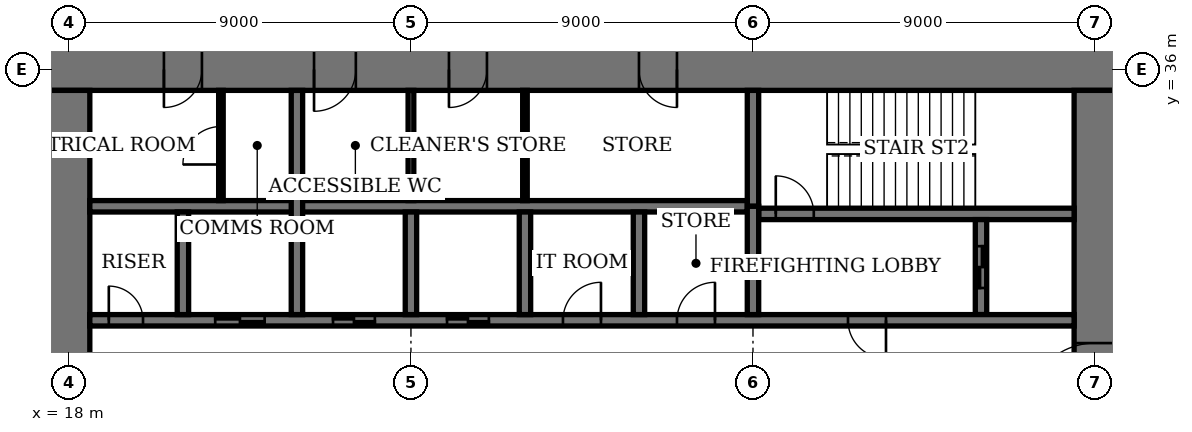
"""IFC4 building model, lengths in metres.
Left out: names, types, materials, properties, quantities, classifications, styles, units other than length and angle.
Written with IfcOpenShell. Run it as: python <this file> out.ifc"""

import sys

from ifc_helpers import new_model, si_unit, direction, frame, frame_2d, origin, place, context, subcontext, project, spatial, rectangle, extrude, element, fill, save


model = new_model("IFC4")
c1 = context("Model", 3, precision=1e-05, world=origin(), true_north=direction((0.0, 1.0)))
c2 = subcontext(c1, "Body", "Model", "MODEL_VIEW")
j1 = project(units=[si_unit("LENGTHUNIT", "METRE"), si_unit("PLANEANGLEUNIT", "RADIAN")], contexts=[c1])
p1 = place(None, origin())
s1 = spatial("IfcSite", under=j1, at=p1, CompositionType="ELEMENT")
p2 = place(p1, origin())
s2 = spatial("IfcBuilding", under=s1, at=p2, CompositionType="ELEMENT")
p3 = place(p2, frame((0.0, 0.0, 190.2)))
s3 = spatial("IfcBuildingStorey", under=s2, at=p3, CompositionType="ELEMENT", Elevation=190.2)
p4 = place(p3, frame((45.55, 36.0, 0.0), z_axis=(0.0, 0.0, 1.0), x_axis=(-1.0, 0.0, 0.0)))
e1 = element("IfcWall", 1, at=p4, inside=s3, PredefinedType="SHEAR", context=c2, shape_type="SweptSolid", body=[
    extrude(rectangle(XDim=28.1, YDim=1.1, at=frame_2d((14.05, 0.0))), origin(), (0.0, 0.0, 1.0), 4.0),
])
p5 = place(p4, frame((11.55, 0.0, 0.0)))
e2 = element("IfcOpeningElement", 2, at=p5, cuts=e1, PredefinedType="OPENING", context=c2, shape_type="SweptSolid", body=[
    extrude(rectangle(XDim=1.0, YDim=2.4, at=frame_2d((0.5, 1.2))), frame((0.0, 0.56, 0.0), z_axis=(0.0, -1.0, 0.0), x_axis=(1.0, 0.0, 0.0)), (0.0, 0.0, 1.0), 1.12),
])
p6 = place(p4, frame((16.55, 0.0, 0.0)))
e3 = element("IfcOpeningElement", 3, at=p6, cuts=e1, PredefinedType="OPENING", context=c2, shape_type="SweptSolid", body=[
    extrude(rectangle(XDim=1.0, YDim=2.4, at=frame_2d((0.5, 1.2))), frame((0.0, 0.56, 0.0), z_axis=(0.0, -1.0, 0.0), x_axis=(1.0, 0.0, 0.0)), (0.0, 0.0, 1.0), 1.12),
])
p7 = place(p4, frame((20.0, 0.0, 0.0)))
e4 = element("IfcOpeningElement", 4, at=p7, cuts=e1, PredefinedType="OPENING", context=c2, shape_type="SweptSolid", body=[
    extrude(rectangle(XDim=1.1, YDim=2.4, at=frame_2d((0.55, 1.2))), frame((0.0, 0.56, 0.0), z_axis=(0.0, -1.0, 0.0), x_axis=(1.0, 0.0, 0.0)), (0.0, 0.0, 1.0), 1.12),
])
p8 = place(p4, frame((24.05, 0.0, 0.0)))
e5 = element("IfcOpeningElement", 5, at=p8, cuts=e1, PredefinedType="OPENING", context=c2, shape_type="SweptSolid", body=[
    extrude(rectangle(XDim=1.0, YDim=2.4, at=frame_2d((0.5, 1.2))), frame((0.0, 0.56, 0.0), z_axis=(0.0, -1.0, 0.0), x_axis=(1.0, 0.0, 0.0)), (0.0, 0.0, 1.0), 1.12),
])
p9 = place(p3, frame((18.0, 35.45, 0.0), z_axis=(0.0, 0.0, 1.0), x_axis=(0.0, -1.0, 0.0)))
e6 = element("IfcWall", 6, at=p9, inside=s3, PredefinedType="SHEAR", context=c2, shape_type="SweptSolid", body=[
    extrude(rectangle(XDim=16.9, YDim=1.1, at=frame_2d((8.45, 0.0))), origin(), (0.0, 0.0, 1.0), 4.0),
])
p10 = place(p9, frame((8.45, 0.0, 0.0)))
e7 = element("IfcOpeningElement", 7, at=p10, cuts=e6, PredefinedType="OPENING", context=c2, shape_type="SweptSolid", body=[
    extrude(rectangle(XDim=1.8, YDim=2.4, at=frame_2d((0.9, 1.2))), frame((0.0, 0.56, 0.0), z_axis=(0.0, -1.0, 0.0), x_axis=(1.0, 0.0, 0.0)), (0.0, 0.0, 1.0), 1.12),
])
p11 = place(p3, frame((45.0, 18.55, 0.0), z_axis=(0.0, 0.0, 1.0), x_axis=(0.0, 1.0, 0.0)))
e8 = element("IfcWall", 8, at=p11, inside=s3, PredefinedType="SHEAR", context=c2, shape_type="SweptSolid", body=[
    extrude(rectangle(XDim=16.9, YDim=1.1, at=frame_2d((8.45, 0.0))), origin(), (0.0, 0.0, 1.0), 4.0),
])
p12 = place(p11, frame((8.45, 0.0, 0.0)))
e9 = element("IfcOpeningElement", 9, at=p12, cuts=e8, PredefinedType="OPENING", context=c2, shape_type="SweptSolid", body=[
    extrude(rectangle(XDim=1.8, YDim=2.4, at=frame_2d((0.9, 1.2))), frame((0.0, 0.56, 0.0), z_axis=(0.0, -1.0, 0.0), x_axis=(1.0, 0.0, 0.0)), (0.0, 0.0, 1.0), 1.12),
])
p13 = place(p3, frame((36.15, 32.2, 0.0), z_axis=(0.0, 0.0, 1.0), x_axis=(1.0, 0.0, 0.0)))
e10 = element("IfcWall", 10, at=p13, inside=s3, PredefinedType="SHEAR", context=c2, shape_type="SweptSolid", body=[
    extrude(rectangle(XDim=8.3, YDim=0.3, at=frame_2d((4.15, 0.0))), origin(), (0.0, 0.0, 1.0), 4.0),
])
p14 = place(p13, frame((0.45, 0.0, 0.0)))
e11 = element("IfcOpeningElement", 11, at=p14, cuts=e10, PredefinedType="OPENING", context=c2, shape_type="SweptSolid", body=[
    extrude(rectangle(XDim=1.0, YDim=2.4, at=frame_2d((0.5, 1.2))), frame((0.0, 0.16, 0.0), z_axis=(0.0, -1.0, 0.0), x_axis=(1.0, 0.0, 0.0)), (0.0, 0.0, 1.0), 0.32),
])
p15 = place(p3, frame((36.0, 32.4, 0.0), z_axis=(0.0, 0.0, 1.0), x_axis=(0.0, 1.0, 0.0)))
e12 = element("IfcWall", 12, at=p15, inside=s3, PredefinedType="SHEAR", context=c2, shape_type="SweptSolid", body=[
    extrude(rectangle(XDim=3.05, YDim=0.3, at=frame_2d((1.525, 0.0))), origin(), (0.0, 0.0, 1.0), 4.0),
])
p16 = place(p3, frame((42.0, 29.55, 0.0), z_axis=(0.0, 0.0, 1.0), x_axis=(0.0, 1.0, 0.0)))
e13 = element("IfcWall", 13, at=p16, inside=s3, PredefinedType="SHEAR", context=c2, shape_type="SweptSolid", body=[
    extrude(rectangle(XDim=2.5, YDim=0.3, at=frame_2d((1.25, 0.0))), origin(), (0.0, 0.0, 1.0), 4.0),
])
p17 = place(p16, frame((0.7, 0.0, 0.0)))
e14 = element("IfcOpeningElement", 14, at=p17, cuts=e13, PredefinedType="OPENING", context=c2, shape_type="SweptSolid", body=[
    extrude(rectangle(XDim=1.1, YDim=2.4, at=frame_2d((0.55, 1.2))), frame((0.0, 0.16, 0.0), z_axis=(0.0, -1.0, 0.0), x_axis=(1.0, 0.0, 0.0)), (0.0, 0.0, 1.0), 0.32),
])
p18 = place(p3, frame((18.55, 29.4, 0.0), z_axis=(0.0, 0.0, 1.0), x_axis=(1.0, 0.0, 0.0)))
e15 = element("IfcWall", 15, at=p18, inside=s3, PredefinedType="SHEAR", context=c2, shape_type="SweptSolid", body=[
    extrude(rectangle(XDim=25.9, YDim=0.3, at=frame_2d((12.95, 0.0))), origin(), (0.0, 0.0, 1.0), 4.0),
])
p19 = place(p18, frame((19.95, 0.0, 0.0)))
e16 = element("IfcOpeningElement", 16, at=p19, cuts=e15, PredefinedType="OPENING", context=c2, shape_type="SweptSolid", body=[
    extrude(rectangle(XDim=1.0, YDim=2.4, at=frame_2d((0.5, 1.2))), frame((0.0, 0.16, 0.0), z_axis=(0.0, -1.0, 0.0), x_axis=(1.0, 0.0, 0.0)), (0.0, 0.0, 1.0), 0.32),
])
p20 = place(p18, frame((0.5, 0.0, 0.0)))
e17 = element("IfcOpeningElement", 17, at=p20, cuts=e15, PredefinedType="OPENING", context=c2, shape_type="SweptSolid", body=[
    extrude(rectangle(XDim=0.9, YDim=2.1, at=frame_2d((0.45, 1.05))), frame((0.0, 0.16, 0.0), z_axis=(0.0, -1.0, 0.0), x_axis=(1.0, 0.0, 0.0)), (0.0, 0.0, 1.0), 0.32),
])
p21 = place(p18, frame((15.45, 0.0, 0.0)))
e18 = element("IfcOpeningElement", 18, at=p21, cuts=e15, PredefinedType="OPENING", context=c2, shape_type="SweptSolid", body=[
    extrude(rectangle(XDim=1.0, YDim=2.4, at=frame_2d((0.5, 1.2))), frame((0.0, 0.16, 0.0), z_axis=(0.0, -1.0, 0.0), x_axis=(1.0, 0.0, 0.0)), (0.0, 0.0, 1.0), 0.32),
])
p22 = place(p18, frame((12.45, 0.0, 0.0)))
e19 = element("IfcOpeningElement", 19, at=p22, cuts=e15, PredefinedType="OPENING", context=c2, shape_type="SweptSolid", body=[
    extrude(rectangle(XDim=1.0, YDim=2.4, at=frame_2d((0.5, 1.2))), frame((0.0, 0.16, 0.0), z_axis=(0.0, -1.0, 0.0), x_axis=(1.0, 0.0, 0.0)), (0.0, 0.0, 1.0), 0.32),
])
p23 = place(p18, frame((9.4, 0.0, 0.0)))
e20 = element("IfcOpeningElement", 20, at=p23, cuts=e15, PredefinedType="OPENING", context=c2, shape_type="SweptSolid", body=[
    extrude(rectangle(XDim=1.1, YDim=2.4, at=frame_2d((0.55, 1.2))), frame((0.0, 0.16, 0.0), z_axis=(0.0, -1.0, 0.0), x_axis=(1.0, 0.0, 0.0)), (0.0, 0.0, 1.0), 0.32),
])
p24 = place(p18, frame((6.4, 0.0, 0.0)))
e21 = element("IfcOpeningElement", 21, at=p24, cuts=e15, PredefinedType="OPENING", context=c2, shape_type="SweptSolid", body=[
    extrude(rectangle(XDim=1.1, YDim=2.4, at=frame_2d((0.55, 1.2))), frame((0.0, 0.16, 0.0), z_axis=(0.0, -1.0, 0.0), x_axis=(1.0, 0.0, 0.0)), (0.0, 0.0, 1.0), 0.32),
])
p25 = place(p18, frame((3.3, 0.0, 0.0)))
e22 = element("IfcOpeningElement", 22, at=p25, cuts=e15, PredefinedType="OPENING", context=c2, shape_type="SweptSolid", body=[
    extrude(rectangle(XDim=1.3, YDim=2.4, at=frame_2d((0.65, 1.2))), frame((0.0, 0.16, 0.0), z_axis=(0.0, -1.0, 0.0), x_axis=(1.0, 0.0, 0.0)), (0.0, 0.0, 1.0), 0.32),
])
p26 = place(p3, frame((18.55, 32.4, 0.0), z_axis=(0.0, 0.0, 1.0), x_axis=(1.0, 0.0, 0.0)))
e23 = element("IfcWall", 23, at=p26, inside=s3, PredefinedType="SHEAR", context=c2, shape_type="SweptSolid", body=[
    extrude(rectangle(XDim=17.3, YDim=0.3, at=frame_2d((8.65, 0.0))), origin(), (0.0, 0.0, 1.0), 4.0),
])
for number, where, z_axis, x_axis in (
    (24, (33.0, 29.55, 0.0), (0.0, 0.0, 1.0), (0.0, 1.0, 0.0)),
    (25, (30.0, 29.55, 0.0), (0.0, 0.0, 1.0), (0.0, 1.0, 0.0)),
    (26, (27.0, 29.55, 0.0), (0.0, 0.0, 1.0), (0.0, 1.0, 0.0)),
):
    element("IfcWall", number, at=place(p3, frame(where, z_axis=z_axis, x_axis=x_axis)), inside=s3, PredefinedType="SHEAR", context=c2, shape_type="SweptSolid", body=[
        extrude(rectangle(XDim=2.7, YDim=0.3, at=frame_2d((1.35, 0.0))), origin(), (0.0, 0.0, 1.0), 4.0),
    ])
p27 = place(p3, frame((24.0, 29.55, 0.0), z_axis=(0.0, 0.0, 1.0), x_axis=(0.0, 1.0, 0.0)))
e27 = element("IfcWall", 27, at=p27, inside=s3, PredefinedType="SHEAR", context=c2, shape_type="SweptSolid", body=[
    extrude(rectangle(XDim=5.9, YDim=0.3, at=frame_2d((2.95, 0.0))), origin(), (0.0, 0.0, 1.0), 4.0),
])
p28 = place(p3, frame((21.0, 29.55, 0.0), z_axis=(0.0, 0.0, 1.0), x_axis=(0.0, 1.0, 0.0)))
e28 = element("IfcWall", 28, at=p28, inside=s3, PredefinedType="SHEAR", context=c2, shape_type="SweptSolid", body=[
    extrude(rectangle(XDim=2.7, YDim=0.3, at=frame_2d((1.35, 0.0))), origin(), (0.0, 0.0, 1.0), 4.0),
])
p29 = place(p3, frame((36.0, 29.55, 0.0), z_axis=(0.0, 0.0, 1.0), x_axis=(0.0, 1.0, 0.0)))
e29 = element("IfcWall", 29, at=p29, inside=s3, PredefinedType="SHEAR", context=c2, shape_type="SweptSolid", body=[
    extrude(rectangle(XDim=2.85, YDim=0.3, at=frame_2d((1.425, 0.0))), origin(), (0.0, 0.0, 1.0), 4.0),
])
p30 = place(p3, frame((30.0, 32.55, 0.0), z_axis=(0.0, 0.0, 1.0), x_axis=(0.0, 1.0, 0.0)))
e30 = element("IfcWall", 30, at=p30, inside=s3, PredefinedType="PARTITIONING", context=c2, shape_type="SweptSolid", body=[
    extrude(rectangle(XDim=2.9, YDim=0.12, at=frame_2d((1.45, 0.0))), origin(), (0.0, 0.0, 1.0), 3.75),
])
p31 = place(p3, frame((27.0, 32.55, 0.0), z_axis=(0.0, 0.0, 1.0), x_axis=(0.0, 1.0, 0.0)))
e31 = element("IfcWall", 31, at=p31, inside=s3, PredefinedType="PARTITIONING", context=c2, shape_type="SweptSolid", body=[
    extrude(rectangle(XDim=2.9, YDim=0.15, at=frame_2d((1.45, 0.0))), origin(), (0.0, 0.0, 1.0), 3.75),
])
p32 = place(p3, frame((22.0, 32.55, 0.0), z_axis=(0.0, 0.0, 1.0), x_axis=(0.0, 1.0, 0.0)))
e32 = element("IfcWall", 32, at=p32, inside=s3, PredefinedType="PARTITIONING", context=c2, shape_type="SweptSolid", body=[
    extrude(rectangle(XDim=2.9, YDim=0.12, at=frame_2d((1.45, 0.0))), origin(), (0.0, 0.0, 1.0), 3.75),
])
p33 = place(p32, frame((0.95, 0.0, 0.0)))
e33 = element("IfcOpeningElement", 33, at=p33, cuts=e32, PredefinedType="OPENING", context=c2, shape_type="SweptSolid", body=[
    extrude(rectangle(XDim=1.0, YDim=2.4, at=frame_2d((0.5, 1.2))), frame((0.0, 0.07, 0.0), z_axis=(0.0, -1.0, 0.0), x_axis=(1.0, 0.0, 0.0)), (0.0, 0.0, 1.0), 0.14),
])
p34 = place(p12, origin())
e34 = element("IfcDoor", 34, at=p34, inside=s3, OperationType="DOUBLE_DOOR_DOUBLE_SWING", PredefinedType="DOOR", context=c2, shape_type="SweptSolid", body=[
    extrude(rectangle(XDim=1.8, YDim=2.4, at=frame_2d((0.9, 1.2))), frame((0.0, 0.03, 0.0), z_axis=(0.0, -1.0, 0.0), x_axis=(1.0, 0.0, 0.0)), (0.0, 0.0, 1.0), 0.06),
    extrude(rectangle(XDim=0.04, YDim=2.4, at=frame_2d((0.02, 1.2))), frame((0.0, 0.55, 0.0), z_axis=(0.0, -1.0, 0.0), x_axis=(1.0, 0.0, 0.0)), (0.0, 0.0, 1.0), 1.1),
    extrude(rectangle(XDim=0.04, YDim=2.4, at=frame_2d((1.78, 1.2))), frame((0.0, 0.55, 0.0), z_axis=(0.0, -1.0, 0.0), x_axis=(1.0, 0.0, 0.0)), (0.0, 0.0, 1.0), 1.1),
    extrude(rectangle(XDim=1.8, YDim=0.04, at=frame_2d((0.9, 2.38))), frame((0.0, 0.55, 0.0), z_axis=(0.0, -1.0, 0.0), x_axis=(1.0, 0.0, 0.0)), (0.0, 0.0, 1.0), 1.1),
])
fill(e9, e34)
p35 = place(p5, origin())
e35 = element("IfcDoor", 35, at=p35, inside=s3, OperationType="SINGLE_SWING_RIGHT", PredefinedType="DOOR", context=c2, shape_type="SweptSolid", body=[
    extrude(rectangle(XDim=1.0, YDim=2.4, at=frame_2d((0.5, 1.2))), frame((0.0, 0.025, 0.0), z_axis=(0.0, -1.0, 0.0), x_axis=(1.0, 0.0, 0.0)), (0.0, 0.0, 1.0), 0.05),
    extrude(rectangle(XDim=0.04, YDim=2.4, at=frame_2d((0.02, 1.2))), frame((0.0, 0.4, 0.0), z_axis=(0.0, -1.0, 0.0), x_axis=(1.0, 0.0, 0.0)), (0.0, 0.0, 1.0), 0.8),
    extrude(rectangle(XDim=0.04, YDim=2.4, at=frame_2d((0.98, 1.2))), frame((0.0, 0.4, 0.0), z_axis=(0.0, -1.0, 0.0), x_axis=(1.0, 0.0, 0.0)), (0.0, 0.0, 1.0), 0.8),
    extrude(rectangle(XDim=1.0, YDim=0.04, at=frame_2d((0.5, 2.38))), frame((0.0, 0.4, 0.0), z_axis=(0.0, -1.0, 0.0), x_axis=(1.0, 0.0, 0.0)), (0.0, 0.0, 1.0), 0.8),
])
fill(e2, e35)
p36 = place(p6, origin())
e36 = element("IfcDoor", 36, at=p36, inside=s3, OperationType="SINGLE_SWING_LEFT", PredefinedType="DOOR", context=c2, shape_type="SweptSolid", body=[
    extrude(rectangle(XDim=1.0, YDim=2.4, at=frame_2d((0.5, 1.2))), frame((0.0, 0.025, 0.0), z_axis=(0.0, -1.0, 0.0), x_axis=(1.0, 0.0, 0.0)), (0.0, 0.0, 1.0), 0.05),
    extrude(rectangle(XDim=0.04, YDim=2.4, at=frame_2d((0.02, 1.2))), frame((0.0, 0.4, 0.0), z_axis=(0.0, -1.0, 0.0), x_axis=(1.0, 0.0, 0.0)), (0.0, 0.0, 1.0), 0.8),
    extrude(rectangle(XDim=0.04, YDim=2.4, at=frame_2d((0.98, 1.2))), frame((0.0, 0.4, 0.0), z_axis=(0.0, -1.0, 0.0), x_axis=(1.0, 0.0, 0.0)), (0.0, 0.0, 1.0), 0.8),
    extrude(rectangle(XDim=1.0, YDim=0.04, at=frame_2d((0.5, 2.38))), frame((0.0, 0.4, 0.0), z_axis=(0.0, -1.0, 0.0), x_axis=(1.0, 0.0, 0.0)), (0.0, 0.0, 1.0), 0.8),
])
fill(e3, e36)
p37 = place(p7, origin())
e37 = element("IfcDoor", 37, at=p37, inside=s3, OperationType="SINGLE_SWING_LEFT", PredefinedType="DOOR", context=c2, shape_type="SweptSolid", body=[
    extrude(rectangle(XDim=1.1, YDim=2.4, at=frame_2d((0.55, 1.2))), frame((0.0, 0.025, 0.0), z_axis=(0.0, -1.0, 0.0), x_axis=(1.0, 0.0, 0.0)), (0.0, 0.0, 1.0), 0.05),
    extrude(rectangle(XDim=0.04, YDim=2.4, at=frame_2d((0.02, 1.2))), frame((0.0, 0.44, 0.0), z_axis=(0.0, -1.0, 0.0), x_axis=(1.0, 0.0, 0.0)), (0.0, 0.0, 1.0), 0.88),
    extrude(rectangle(XDim=0.04, YDim=2.4, at=frame_2d((1.08, 1.2))), frame((0.0, 0.44, 0.0), z_axis=(0.0, -1.0, 0.0), x_axis=(1.0, 0.0, 0.0)), (0.0, 0.0, 1.0), 0.88),
    extrude(rectangle(XDim=1.1, YDim=0.04, at=frame_2d((0.55, 2.38))), frame((0.0, 0.44, 0.0), z_axis=(0.0, -1.0, 0.0), x_axis=(1.0, 0.0, 0.0)), (0.0, 0.0, 1.0), 0.88),
])
fill(e4, e37)
p38 = place(p8, origin())
e38 = element("IfcDoor", 38, at=p38, inside=s3, OperationType="SINGLE_SWING_LEFT", PredefinedType="DOOR", context=c2, shape_type="SweptSolid", body=[
    extrude(rectangle(XDim=1.0, YDim=2.4, at=frame_2d((0.5, 1.2))), frame((0.0, 0.025, 0.0), z_axis=(0.0, -1.0, 0.0), x_axis=(1.0, 0.0, 0.0)), (0.0, 0.0, 1.0), 0.05),
    extrude(rectangle(XDim=0.04, YDim=2.4, at=frame_2d((0.02, 1.2))), frame((0.0, 0.4, 0.0), z_axis=(0.0, -1.0, 0.0), x_axis=(1.0, 0.0, 0.0)), (0.0, 0.0, 1.0), 0.8),
    extrude(rectangle(XDim=0.04, YDim=2.4, at=frame_2d((0.98, 1.2))), frame((0.0, 0.4, 0.0), z_axis=(0.0, -1.0, 0.0), x_axis=(1.0, 0.0, 0.0)), (0.0, 0.0, 1.0), 0.8),
    extrude(rectangle(XDim=1.0, YDim=0.04, at=frame_2d((0.5, 2.38))), frame((0.0, 0.4, 0.0), z_axis=(0.0, -1.0, 0.0), x_axis=(1.0, 0.0, 0.0)), (0.0, 0.0, 1.0), 0.8),
])
fill(e5, e38)
p39 = place(p14, origin())
e39 = element("IfcDoor", 39, at=p39, inside=s3, OperationType="SINGLE_SWING_RIGHT", PredefinedType="DOOR", context=c2, shape_type="SweptSolid", body=[
    extrude(rectangle(XDim=1.0, YDim=2.4, at=frame_2d((0.5, 1.2))), frame((0.0, 0.03, 0.0), z_axis=(0.0, -1.0, 0.0), x_axis=(1.0, 0.0, 0.0)), (0.0, 0.0, 1.0), 0.06),
])
fill(e11, e39)
p40 = place(p19, origin())
e40 = element("IfcDoor", 40, at=p40, inside=s3, OperationType="SINGLE_SWING_RIGHT", PredefinedType="DOOR", context=c2, shape_type="SweptSolid", body=[
    extrude(rectangle(XDim=1.0, YDim=2.4, at=frame_2d((0.5, 1.2))), frame((0.0, 0.03, 0.0), z_axis=(0.0, -1.0, 0.0), x_axis=(1.0, 0.0, 0.0)), (0.0, 0.0, 1.0), 0.06),
])
fill(e16, e40)
p41 = place(p20, origin())
e41 = element("IfcDoor", 41, at=p41, inside=s3, OperationType="SINGLE_SWING_RIGHT", PredefinedType="DOOR", context=c2, shape_type="SweptSolid", body=[
    extrude(rectangle(XDim=0.9, YDim=2.1, at=frame_2d((0.45, 1.05))), frame((0.0, 0.03, 0.0), z_axis=(0.0, -1.0, 0.0), x_axis=(1.0, 0.0, 0.0)), (0.0, 0.0, 1.0), 0.06),
])
fill(e17, e41)
p42 = place(p33, origin())
e42 = element("IfcDoor", 42, at=p42, inside=s3, OperationType="SINGLE_SWING_RIGHT", PredefinedType="DOOR", context=c2, shape_type="SweptSolid", body=[
    extrude(rectangle(XDim=1.0, YDim=2.4, at=frame_2d((0.5, 1.2))), frame((0.0, 0.03, 0.0), z_axis=(0.0, -1.0, 0.0), x_axis=(1.0, 0.0, 0.0)), (0.0, 0.0, 1.0), 0.06),
])
fill(e33, e42)
p43 = place(p21, origin())
e43 = element("IfcDoor", 43, at=p43, inside=s3, OperationType="SINGLE_SWING_LEFT", PredefinedType="DOOR", context=c2, shape_type="SweptSolid", body=[
    extrude(rectangle(XDim=1.0, YDim=2.4, at=frame_2d((0.5, 1.2))), frame((0.0, 0.03, 0.0), z_axis=(0.0, -1.0, 0.0), x_axis=(1.0, 0.0, 0.0)), (0.0, 0.0, 1.0), 0.06),
])
fill(e18, e43)
p44 = place(p22, origin())
e44 = element("IfcDoor", 44, at=p44, inside=s3, OperationType="SINGLE_SWING_LEFT", PredefinedType="DOOR", context=c2, shape_type="SweptSolid", body=[
    extrude(rectangle(XDim=1.0, YDim=2.4, at=frame_2d((0.5, 1.2))), frame((0.0, 0.03, 0.0), z_axis=(0.0, -1.0, 0.0), x_axis=(1.0, 0.0, 0.0)), (0.0, 0.0, 1.0), 0.06),
])
fill(e19, e44)
p45 = place(p23, origin())
e45 = element("IfcDoor", 45, at=p45, inside=s3, OperationType="DOUBLE_DOOR_SLIDING", PredefinedType="DOOR", context=c2, shape_type="SweptSolid", body=[
    extrude(rectangle(XDim=1.1, YDim=2.4, at=frame_2d((0.55, 1.2))), frame((0.0, 0.02, 0.0), z_axis=(0.0, -1.0, 0.0), x_axis=(1.0, 0.0, 0.0)), (0.0, 0.0, 1.0), 0.04),
])
fill(e20, e45)
p46 = place(p24, origin())
e46 = element("IfcDoor", 46, at=p46, inside=s3, OperationType="DOUBLE_DOOR_SLIDING", PredefinedType="DOOR", context=c2, shape_type="SweptSolid", body=[
    extrude(rectangle(XDim=1.1, YDim=2.4, at=frame_2d((0.55, 1.2))), frame((0.0, 0.02, 0.0), z_axis=(0.0, -1.0, 0.0), x_axis=(1.0, 0.0, 0.0)), (0.0, 0.0, 1.0), 0.04),
])
fill(e21, e46)
p47 = place(p25, origin())
e47 = element("IfcDoor", 47, at=p47, inside=s3, OperationType="DOUBLE_DOOR_SLIDING", PredefinedType="DOOR", context=c2, shape_type="SweptSolid", body=[
    extrude(rectangle(XDim=1.3, YDim=2.4, at=frame_2d((0.65, 1.2))), frame((0.0, 0.02, 0.0), z_axis=(0.0, -1.0, 0.0), x_axis=(1.0, 0.0, 0.0)), (0.0, 0.0, 1.0), 0.04),
])
fill(e22, e47)
p48 = place(p17, origin())
e48 = element("IfcDoor", 48, at=p48, inside=s3, OperationType="DOUBLE_DOOR_SLIDING", PredefinedType="DOOR", context=c2, shape_type="SweptSolid", body=[
    extrude(rectangle(XDim=1.1, YDim=2.4, at=frame_2d((0.55, 1.2))), frame((0.0, 0.03, 0.0), z_axis=(0.0, -1.0, 0.0), x_axis=(1.0, 0.0, 0.0)), (0.0, 0.0, 1.0), 0.06),
])
fill(e14, e48)
save(model, sys.argv[1])
